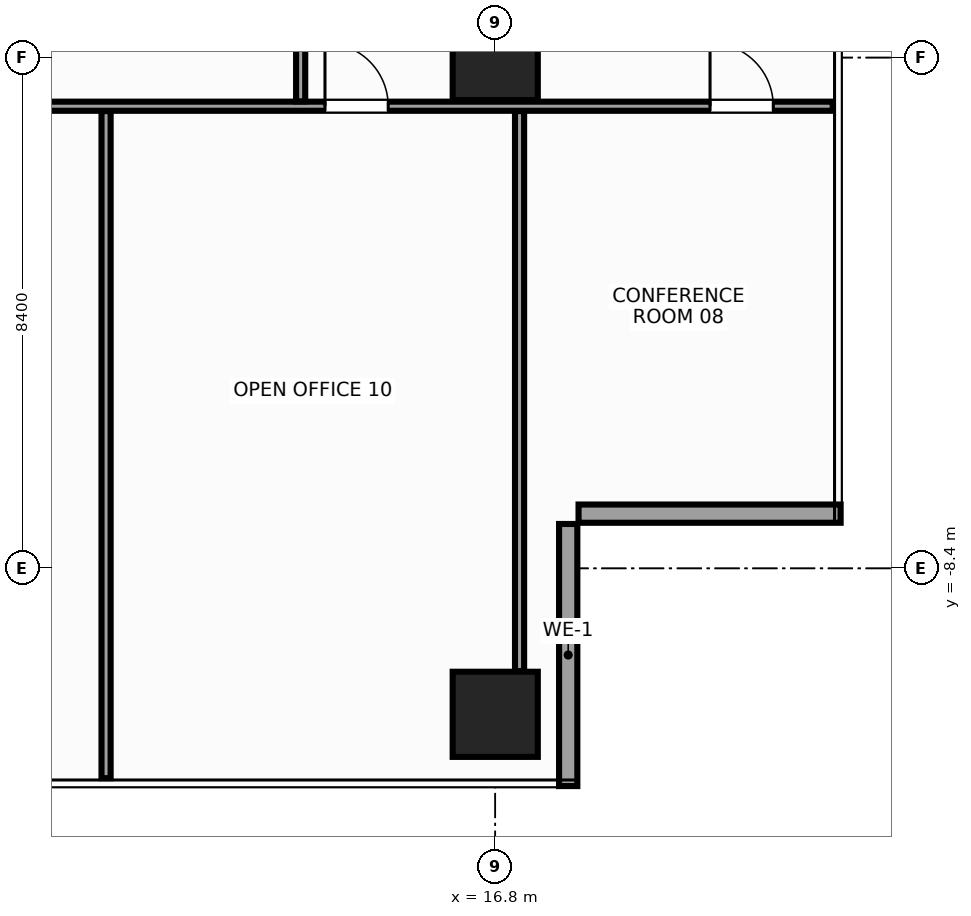
"""IFC4 building model, lengths in metres.
Left out: names, types, materials, properties, quantities, classifications, styles, units other than length and angle.
Written with IfcOpenShell. Run it as: python <this file> out.ifc"""

import sys

from ifc_helpers import new_model, si_unit, direction, frame, frame_2d, origin, origin_2d, place, context, subcontext, project, spatial, rectangle, extrude, source, transform, mapped, element, fill, save


model = new_model("IFC4")
c1 = context("Model", 3, precision=1e-05, world=origin(), true_north=direction((0.0, 1.0)))
c2 = subcontext(c1, "Body", "Model", "MODEL_VIEW")
j1 = project(units=[si_unit("LENGTHUNIT", "METRE"), si_unit("PLANEANGLEUNIT", "RADIAN")], contexts=[c1])
p1 = place(None, origin())
s1 = spatial("IfcSite", under=j1, at=p1, CompositionType="ELEMENT")
p2 = place(p1, origin())
s2 = spatial("IfcBuilding", under=s1, at=p2, CompositionType="ELEMENT")
p3 = place(p2, frame((0.0, 0.0, 246.8)))
s3 = spatial("IfcBuildingStorey", under=s2, at=p3, CompositionType="ELEMENT", Elevation=246.8)
m1 = source(origin(), c2, "Body", "SweptSolid", [
    extrude(rectangle(XDim=1.4, YDim=1.4, at=origin_2d()), origin(), (0.0, 0.0, 1.0), 3.6),
])
for number, where, z_axis, x_axis in (
    (1, (16.8, -10.8, 0.0), (0.0, 0.0, 1.0), (1.0, 0.0, 0.0)),
    (2, (16.8, 0.0, 0.0), (0.0, 0.0, 1.0), (1.0, 0.0, 0.0)),
):
    element("IfcColumn", number, at=place(p3, frame(where, z_axis=z_axis, x_axis=x_axis)), inside=s3, PredefinedType="COLUMN", context=c2, shape_type="MappedRepresentation", body=[
        mapped(m1, transform((0.0, 0.0, 0.0), x_axis=(1.0, 0.0, 0.0), y_axis=(0.0, 1.0, 0.0), z_axis=(0.0, 0.0, 1.0), scale=1.0)),
    ])
m2 = source(origin(), c2, "Body", "SweptSolid", [
    extrude(rectangle(XDim=4.31, YDim=0.3, at=frame_2d((2.155, 0.0))), origin(), (0.0, 0.0, 1.0), 2.75),
])
for number, where, z_axis, x_axis in (
    (3, (18.0, -11.98, 0.0), (0.0, 0.0, 1.0), (0.0, 1.0, 0.0)),
    (4, (18.17, -7.5, 0.0), (0.0, 0.0, 1.0), (1.0, 0.0, 0.0)),
):
    element("IfcWall", number, at=place(p3, frame(where, z_axis=z_axis, x_axis=x_axis)), inside=s3, PredefinedType="STANDARD", context=c2, shape_type="MappedRepresentation", body=[
        mapped(m2, transform((0.0, 0.0, 0.0), x_axis=(1.0, 0.0, 0.0), y_axis=(0.0, 1.0, 0.0), z_axis=(0.0, 0.0, 1.0), scale=1.0)),
    ])
m3 = source(origin(), c2, "Body", "SweptSolid", [
    extrude(rectangle(XDim=24.295, YDim=0.15, at=frame_2d((12.147, 0.0))), origin(), (0.0, 0.0, 1.0), 2.755),
])
p4 = place(p3, frame((-1.945, -0.8, 0.0), z_axis=(0.0, 0.0, 1.0), x_axis=(1.0, 0.0, 0.0)))
e5 = element("IfcWall", 5, at=p4, inside=s3, PredefinedType="PARTITIONING", context=c2, shape_type="MappedRepresentation", body=[
    mapped(m3, transform((0.0, 0.0, 0.0), x_axis=(1.0, 0.0, 0.0), y_axis=(0.0, 1.0, 0.0), z_axis=(0.0, 0.0, 1.0), scale=1.0)),
])
p5 = place(p4, frame((22.278, 0.0, 0.0)))
e6 = element("IfcOpeningElement", 6, at=p5, cuts=e5, PredefinedType="OPENING", context=c2, shape_type="SweptSolid", body=[
    extrude(rectangle(XDim=1.04, YDim=2.2, at=frame_2d((0.52, 1.1))), frame((0.0, 0.087, 0.0), z_axis=(0.0, -1.0, 0.0), x_axis=(1.0, 0.0, 0.0)), (0.0, 0.0, 1.0), 0.174),
])
p6 = place(p4, frame((15.945, 0.0, 0.0)))
e7 = element("IfcOpeningElement", 7, at=p6, cuts=e5, PredefinedType="OPENING", context=c2, shape_type="SweptSolid", body=[
    extrude(rectangle(XDim=1.04, YDim=2.2, at=frame_2d((0.52, 1.1))), frame((0.0, 0.087, 0.0), z_axis=(0.0, -1.0, 0.0), x_axis=(1.0, 0.0, 0.0)), (0.0, 0.0, 1.0), 0.174),
])
m4 = source(origin(), c2, "Body", "SweptSolid", [
    extrude(rectangle(XDim=8.365, YDim=0.15, at=frame_2d((4.183, 0.0))), origin(), (0.0, 0.0, 1.0), 2.655),
])
p7 = place(p3, frame((13.6, -0.72, 0.0), z_axis=(0.0, 0.0, 1.0), x_axis=(0.0, 1.0, 0.0)))
e8 = element("IfcWall", 8, at=p7, inside=s3, PredefinedType="PARTITIONING", context=c2, shape_type="MappedRepresentation", body=[
    mapped(m4, transform((0.0, 0.0, 0.0), x_axis=(1.0, 0.0, 0.0), y_axis=(0.0, 1.0, 0.0), z_axis=(0.0, 0.0, 1.0), scale=1.0)),
])
m5 = source(origin(), c2, "Body", "SweptSolid", [
    extrude(rectangle(XDim=10.97, YDim=0.15, at=frame_2d((5.485, 0.0))), origin(), (0.0, 0.0, 1.0), 2.905),
])
p8 = place(p3, frame((10.4, -11.85, 0.0), z_axis=(0.0, 0.0, 1.0), x_axis=(0.0, 1.0, 0.0)))
e9 = element("IfcWall", 9, at=p8, inside=s3, PredefinedType="PARTITIONING", context=c2, shape_type="MappedRepresentation", body=[
    mapped(m5, transform((0.0, 0.0, 0.0), x_axis=(1.0, 0.0, 0.0), y_axis=(0.0, 1.0, 0.0), z_axis=(0.0, 0.0, 1.0), scale=1.0)),
])
m6 = source(origin(), c2, "Body", "SweptSolid", [
    extrude(rectangle(XDim=9.21, YDim=0.15, at=frame_2d((4.605, 0.0))), origin(), (0.0, 0.0, 1.0), 3.37),
])
p9 = place(p3, frame((17.2, -10.09, 0.0), z_axis=(0.0, 0.0, 1.0), x_axis=(0.0, 1.0, 0.0)))
e10 = element("IfcWall", 10, at=p9, inside=s3, PredefinedType="PARTITIONING", context=c2, shape_type="MappedRepresentation", body=[
    mapped(m6, transform((0.0, 0.0, 0.0), x_axis=(1.0, 0.0, 0.0), y_axis=(0.0, 1.0, 0.0), z_axis=(0.0, 0.0, 1.0), scale=1.0)),
])
m7 = source(origin(), c2, "Body", "SweptSolid", [
    extrude(rectangle(XDim=1.04, YDim=2.2, at=frame_2d((0.52, 1.1))), frame((0.0, 0.025, 0.0), z_axis=(0.0, -1.0, 0.0), x_axis=(1.0, 0.0, 0.0)), (0.0, 0.0, 1.0), 0.05),
])
p10 = place(p5, origin())
e11 = element("IfcDoor", 11, at=p10, inside=s3, OperationType="SINGLE_SWING_LEFT", PredefinedType="DOOR", context=c2, shape_type="MappedRepresentation", body=[
    mapped(m7, transform((0.0, 0.0, 0.0), x_axis=(1.0, 0.0, 0.0), y_axis=(0.0, 1.0, 0.0), z_axis=(0.0, 0.0, 1.0), scale=1.0)),
])
fill(e6, e11)
p11 = place(p6, origin())
e12 = element("IfcDoor", 12, at=p11, inside=s3, OperationType="SINGLE_SWING_LEFT", PredefinedType="DOOR", context=c2, shape_type="MappedRepresentation", body=[
    mapped(m7, transform((0.0, 0.0, 0.0), x_axis=(1.0, 0.0, 0.0), y_axis=(0.0, 1.0, 0.0), z_axis=(0.0, 0.0, 1.0), scale=1.0)),
])
fill(e7, e12)
save(model, sys.argv[1])
